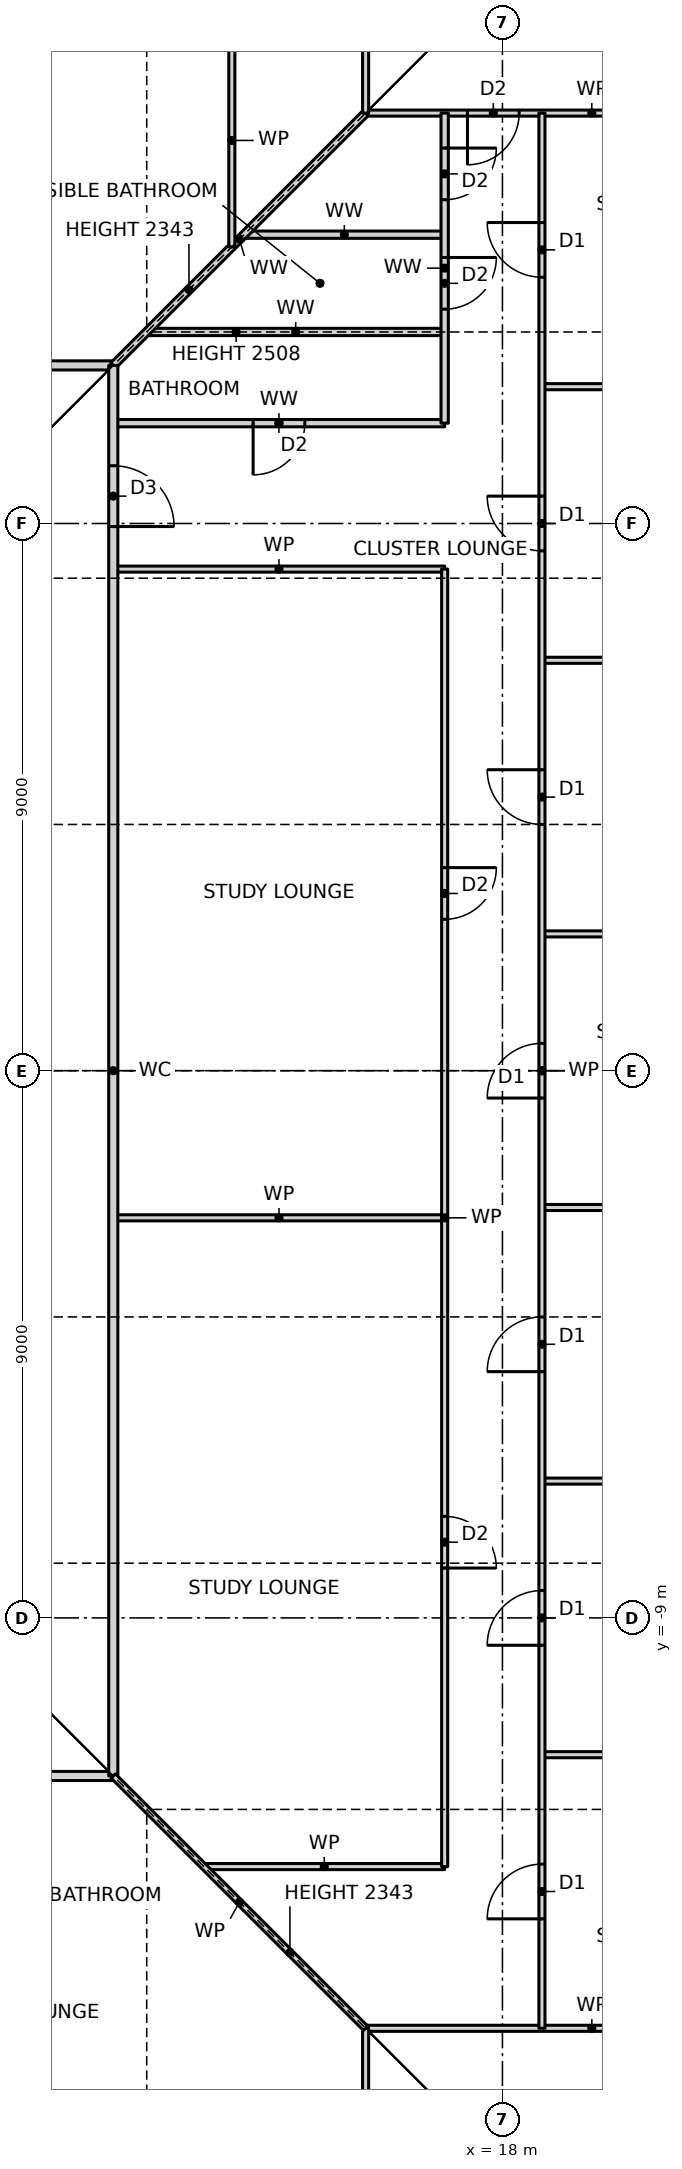
"""IFC4 building model, lengths in metres.
Left out: names, types, materials, properties, quantities, classifications, styles, units other than length and angle.
Written with IfcOpenShell. Run it as: python <this file> out.ifc"""

import sys

from ifc_helpers import new_model, si_unit, direction, frame, frame_2d, origin, place, context, subcontext, project, spatial, rectangle, extrude, element, fill, save


model = new_model("IFC4")
c1 = context("Model", 3, precision=1e-05, world=origin(), true_north=direction((0.0, 1.0)))
c2 = subcontext(c1, "Body", "Model", "MODEL_VIEW")
j1 = project(units=[si_unit("LENGTHUNIT", "METRE"), si_unit("PLANEANGLEUNIT", "RADIAN")], contexts=[c1])
p1 = place(None, origin())
s1 = spatial("IfcSite", under=j1, at=p1, CompositionType="ELEMENT")
p2 = place(p1, origin())
s2 = spatial("IfcBuilding", under=s1, at=p2, CompositionType="ELEMENT")
p3 = place(p2, frame((0.0, 0.0, 53.5)))
s3 = spatial("IfcBuildingStorey", under=s2, at=p3, CompositionType="ELEMENT", Elevation=53.5)
p4 = place(p3, frame((15.75, -15.75, 0.0), z_axis=(0.0, 0.0, 1.0), x_axis=(1.0, 0.0, 0.0)))
e1 = element("IfcWall", 1, at=p4, inside=s3, PredefinedType="PARTITIONING", context=c2, shape_type="SweptSolid", body=[
    extrude(rectangle(XDim=7.44, YDim=0.1, at=frame_2d((3.72, 0.0))), origin(), (0.0, 0.0, 1.0), 3.27),
])
p5 = place(p3, frame((13.09, -13.09, 0.0), z_axis=(0.0, 0.0, 1.0), x_axis=(1.0, 0.0, 0.0)))
e2 = element("IfcWall", 2, at=p5, inside=s3, PredefinedType="PARTITIONING", context=c2, shape_type="SweptSolid", body=[
    extrude(rectangle(XDim=3.96, YDim=0.1, at=frame_2d((1.98, 0.0))), origin(), (0.0, 0.0, 1.0), 3.27),
])
p6 = place(p3, frame((-12.6, -11.6, 0.0), z_axis=(0.0, 0.0, 1.0), x_axis=(1.0, 0.0, 0.0)))
e3 = element("IfcWall", 3, at=p6, inside=s3, PredefinedType="PARTITIONING", context=c2, shape_type="SweptSolid", body=[
    extrude(rectangle(XDim=24.2, YDim=0.15, at=frame_2d((12.1, 0.0))), origin(), (0.0, 0.0, 1.0), 3.27),
])
p7 = place(p6, frame((1.74, 0.0, 0.0)))
e4 = element("IfcOpeningElement", 4, at=p7, cuts=e3, PredefinedType="OPENING", context=c2, shape_type="SweptSolid", body=[
    extrude(rectangle(XDim=1.0, YDim=2.1, at=frame_2d((0.5, 1.05))), frame((0.0, 0.085, 0.0), z_axis=(0.0, -1.0, 0.0), x_axis=(1.0, 0.0, 0.0)), (0.0, 0.0, 1.0), 0.17),
])
p8 = place(p6, frame((22.025, 0.0, 0.0)))
e5 = element("IfcOpeningElement", 5, at=p8, cuts=e3, PredefinedType="OPENING", context=c2, shape_type="SweptSolid", body=[
    extrude(rectangle(XDim=1.0, YDim=2.1, at=frame_2d((0.5, 1.05))), frame((0.0, 0.085, 0.0), z_axis=(0.0, -1.0, 0.0), x_axis=(1.0, 0.0, 0.0)), (0.0, 0.0, 1.0), 0.17),
])
for number, where, z_axis, x_axis in (
    (6, (18.65, -11.25, 0.0), (0.0, 0.0, 1.0), (1.0, 0.0, 0.0)),
    (7, (18.65, -6.75, 0.0), (0.0, 0.0, 1.0), (1.0, 0.0, 0.0)),
):
    element("IfcWall", number, at=place(p3, frame(where, z_axis=z_axis, x_axis=x_axis)), inside=s3, PredefinedType="PARTITIONING", context=c2, shape_type="SweptSolid", body=[
        extrude(rectangle(XDim=4.54, YDim=0.1, at=frame_2d((2.27, 0.0))), origin(), (0.0, 0.0, 1.0), 3.27),
    ])
p9 = place(p3, frame((11.6, -2.42, 0.0), z_axis=(0.0, 0.0, 1.0), x_axis=(1.0, 0.0, 0.0)))
e8 = element("IfcWall", 8, at=p9, inside=s3, PredefinedType="PARTITIONING", context=c2, shape_type="SweptSolid", body=[
    extrude(rectangle(XDim=5.45, YDim=0.1, at=frame_2d((2.725, 0.0))), origin(), (0.0, 0.0, 1.0), 3.27),
])
for number, where, z_axis, x_axis in (
    (9, (18.65, -2.25, 0.0), (0.0, 0.0, 1.0), (1.0, 0.0, 0.0)),
    (10, (18.65, 2.25, 0.0), (0.0, 0.0, 1.0), (1.0, 0.0, 0.0)),
    (11, (18.65, 6.75, 0.0), (0.0, 0.0, 1.0), (1.0, 0.0, 0.0)),
):
    element("IfcWall", number, at=place(p3, frame(where, z_axis=z_axis, x_axis=x_axis)), inside=s3, PredefinedType="PARTITIONING", context=c2, shape_type="SweptSolid", body=[
        extrude(rectangle(XDim=4.54, YDim=0.1, at=frame_2d((2.27, 0.0))), origin(), (0.0, 0.0, 1.0), 3.27),
    ])
p10 = place(p3, frame((11.6, 8.25, 0.0), z_axis=(0.0, 0.0, 1.0), x_axis=(1.0, 0.0, 0.0)))
e12 = element("IfcWall", 12, at=p10, inside=s3, PredefinedType="PARTITIONING", context=c2, shape_type="SweptSolid", body=[
    extrude(rectangle(XDim=5.45, YDim=0.1, at=frame_2d((2.725, 0.0))), origin(), (0.0, 0.0, 1.0), 3.27),
])
p11 = place(p3, frame((11.6, 10.65, 0.0), z_axis=(0.0, 0.0, 1.0), x_axis=(1.0, 0.0, 0.0)))
e13 = element("IfcWall", 13, at=p11, inside=s3, PredefinedType="PARTITIONING", context=c2, shape_type="SweptSolid", body=[
    extrude(rectangle(XDim=5.45, YDim=0.12, at=frame_2d((2.725, 0.0))), origin(), (0.0, 0.0, 1.0), 3.27),
])
p12 = place(p11, frame((2.3, 0.0, 0.0)))
e14 = element("IfcOpeningElement", 14, at=p12, cuts=e13, PredefinedType="OPENING", context=c2, shape_type="SweptSolid", body=[
    extrude(rectangle(XDim=0.85, YDim=2.1, at=frame_2d((0.425, 1.05))), frame((0.0, 0.07, 0.0), z_axis=(0.0, -1.0, 0.0), x_axis=(1.0, 0.0, 0.0)), (0.0, 0.0, 1.0), 0.14),
])
p13 = place(p3, frame((18.65, 11.25, 0.0), z_axis=(0.0, 0.0, 1.0), x_axis=(1.0, 0.0, 0.0)))
e15 = element("IfcWall", 15, at=p13, inside=s3, PredefinedType="PARTITIONING", context=c2, shape_type="SweptSolid", body=[
    extrude(rectangle(XDim=4.54, YDim=0.1, at=frame_2d((2.27, 0.0))), origin(), (0.0, 0.0, 1.0), 3.27),
])
p14 = place(p3, frame((-12.6, 11.6, 0.0), z_axis=(0.0, 0.0, 1.0), x_axis=(1.0, 0.0, 0.0)))
e16 = element("IfcWall", 16, at=p14, inside=s3, PredefinedType="PARTITIONING", context=c2, shape_type="SweptSolid", body=[
    extrude(rectangle(XDim=24.2, YDim=0.15, at=frame_2d((12.1, 0.0))), origin(), (0.0, 0.0, 1.0), 3.27),
])
p15 = place(p14, frame((8.95, 0.0, 0.0)))
e17 = element("IfcOpeningElement", 17, at=p15, cuts=e16, PredefinedType="OPENING", context=c2, shape_type="SweptSolid", body=[
    extrude(rectangle(XDim=1.0, YDim=2.1, at=frame_2d((0.5, 1.05))), frame((0.0, 0.085, 0.0), z_axis=(0.0, -1.0, 0.0), x_axis=(1.0, 0.0, 0.0)), (0.0, 0.0, 1.0), 0.17),
])
p16 = place(p14, frame((6.9, 0.0, 0.0)))
e18 = element("IfcOpeningElement", 18, at=p16, cuts=e16, PredefinedType="OPENING", context=c2, shape_type="SweptSolid", body=[
    extrude(rectangle(XDim=0.9, YDim=2.1, at=frame_2d((0.45, 1.05))), frame((0.0, 0.085, 0.0), z_axis=(0.0, -1.0, 0.0), x_axis=(1.0, 0.0, 0.0)), (0.0, 0.0, 1.0), 0.17),
])
p17 = place(p3, frame((12.15, 12.15, 0.0), z_axis=(0.0, 0.0, 1.0), x_axis=(1.0, 0.0, 0.0)))
e19 = element("IfcWall", 19, at=p17, inside=s3, PredefinedType="PARTITIONING", context=c2, shape_type="SweptSolid", body=[
    extrude(rectangle(XDim=4.9, YDim=0.12, at=frame_2d((2.45, 0.0))), origin(), (0.0, 0.0, 1.0), 2.508),
])
p18 = place(p3, frame((13.75, 13.75, 0.0), z_axis=(0.0, 0.0, 1.0), x_axis=(1.0, 0.0, 0.0)))
e20 = element("IfcWall", 20, at=p18, inside=s3, PredefinedType="PARTITIONING", context=c2, shape_type="SweptSolid", body=[
    extrude(rectangle(XDim=3.3, YDim=0.12, at=frame_2d((1.65, 0.0))), origin(), (0.0, 0.0, 1.0), 3.27),
])
p19 = place(p3, frame((15.75, 15.75, 0.0), z_axis=(0.0, 0.0, 1.0), x_axis=(1.0, 0.0, 0.0)))
e21 = element("IfcWall", 21, at=p19, inside=s3, PredefinedType="PARTITIONING", context=c2, shape_type="SweptSolid", body=[
    extrude(rectangle(XDim=7.44, YDim=0.1, at=frame_2d((3.72, 0.0))), origin(), (0.0, 0.0, 1.0), 3.27),
])
p20 = place(p19, frame((1.675, 0.0, 0.0)))
e22 = element("IfcOpeningElement", 22, at=p20, cuts=e21, PredefinedType="OPENING", context=c2, shape_type="SweptSolid", body=[
    extrude(rectangle(XDim=0.85, YDim=2.1, at=frame_2d((0.425, 1.05))), frame((0.0, 0.06, 0.0), z_axis=(0.0, -1.0, 0.0), x_axis=(1.0, 0.0, 0.0)), (0.0, 0.0, 1.0), 0.12),
])
p21 = place(p3, frame((11.6, 11.6, 0.0), z_axis=(0.0, 0.0, 1.0), x_axis=(0.707106781187, 0.707106781187, 0.0)))
e23 = element("IfcWall", 23, at=p21, inside=s3, PredefinedType="PARTITIONING", context=c2, shape_type="SweptSolid", body=[
    extrude(rectangle(XDim=5.869, YDim=0.12, at=frame_2d((2.935, 0.0))), origin(), (0.0, 0.0, 1.0), 2.343),
])
p22 = place(p3, frame((18.65, -15.75, 0.0), z_axis=(0.0, 0.0, 1.0), x_axis=(0.0, 1.0, 0.0)))
e24 = element("IfcWall", 24, at=p22, inside=s3, PredefinedType="PARTITIONING", context=c2, shape_type="SweptSolid", body=[
    extrude(rectangle(XDim=31.5, YDim=0.1, at=frame_2d((15.75, 0.0))), origin(), (0.0, 0.0, 1.0), 3.27),
])
p23 = place(p22, frame((1.8, 0.0, 0.0)))
e25 = element("IfcOpeningElement", 25, at=p23, cuts=e24, PredefinedType="OPENING", context=c2, shape_type="SweptSolid", body=[
    extrude(rectangle(XDim=0.9, YDim=2.1, at=frame_2d((0.45, 1.05))), frame((0.0, 0.06, 0.0), z_axis=(0.0, -1.0, 0.0), x_axis=(1.0, 0.0, 0.0)), (0.0, 0.0, 1.0), 0.12),
])
p24 = place(p22, frame((6.3, 0.0, 0.0)))
e26 = element("IfcOpeningElement", 26, at=p24, cuts=e24, PredefinedType="OPENING", context=c2, shape_type="SweptSolid", body=[
    extrude(rectangle(XDim=0.9, YDim=2.1, at=frame_2d((0.45, 1.05))), frame((0.0, 0.06, 0.0), z_axis=(0.0, -1.0, 0.0), x_axis=(1.0, 0.0, 0.0)), (0.0, 0.0, 1.0), 0.12),
])
p25 = place(p22, frame((10.8, 0.0, 0.0)))
e27 = element("IfcOpeningElement", 27, at=p25, cuts=e24, PredefinedType="OPENING", context=c2, shape_type="SweptSolid", body=[
    extrude(rectangle(XDim=0.9, YDim=2.1, at=frame_2d((0.45, 1.05))), frame((0.0, 0.06, 0.0), z_axis=(0.0, -1.0, 0.0), x_axis=(1.0, 0.0, 0.0)), (0.0, 0.0, 1.0), 0.12),
])
p26 = place(p22, frame((15.3, 0.0, 0.0)))
e28 = element("IfcOpeningElement", 28, at=p26, cuts=e24, PredefinedType="OPENING", context=c2, shape_type="SweptSolid", body=[
    extrude(rectangle(XDim=0.9, YDim=2.1, at=frame_2d((0.45, 1.05))), frame((0.0, 0.06, 0.0), z_axis=(0.0, -1.0, 0.0), x_axis=(1.0, 0.0, 0.0)), (0.0, 0.0, 1.0), 0.12),
])
p27 = place(p22, frame((19.8, 0.0, 0.0)))
e29 = element("IfcOpeningElement", 29, at=p27, cuts=e24, PredefinedType="OPENING", context=c2, shape_type="SweptSolid", body=[
    extrude(rectangle(XDim=0.9, YDim=2.1, at=frame_2d((0.45, 1.05))), frame((0.0, 0.06, 0.0), z_axis=(0.0, -1.0, 0.0), x_axis=(1.0, 0.0, 0.0)), (0.0, 0.0, 1.0), 0.12),
])
p28 = place(p22, frame((24.3, 0.0, 0.0)))
e30 = element("IfcOpeningElement", 30, at=p28, cuts=e24, PredefinedType="OPENING", context=c2, shape_type="SweptSolid", body=[
    extrude(rectangle(XDim=0.9, YDim=2.1, at=frame_2d((0.45, 1.05))), frame((0.0, 0.06, 0.0), z_axis=(0.0, -1.0, 0.0), x_axis=(1.0, 0.0, 0.0)), (0.0, 0.0, 1.0), 0.12),
])
p29 = place(p22, frame((28.8, 0.0, 0.0)))
e31 = element("IfcOpeningElement", 31, at=p29, cuts=e24, PredefinedType="OPENING", context=c2, shape_type="SweptSolid", body=[
    extrude(rectangle(XDim=0.9, YDim=2.1, at=frame_2d((0.45, 1.05))), frame((0.0, 0.06, 0.0), z_axis=(0.0, -1.0, 0.0), x_axis=(1.0, 0.0, 0.0)), (0.0, 0.0, 1.0), 0.12),
])
p30 = place(p3, frame((17.05, -13.09, 0.0), z_axis=(0.0, 0.0, 1.0), x_axis=(0.0, 1.0, 0.0)))
e32 = element("IfcWall", 32, at=p30, inside=s3, PredefinedType="PARTITIONING", context=c2, shape_type="SweptSolid", body=[
    extrude(rectangle(XDim=21.34, YDim=0.1, at=frame_2d((10.67, 0.0))), origin(), (0.0, 0.0, 1.0), 3.27),
])
p31 = place(p30, frame((4.91, 0.0, 0.0)))
e33 = element("IfcOpeningElement", 33, at=p31, cuts=e32, PredefinedType="OPENING", context=c2, shape_type="SweptSolid", body=[
    extrude(rectangle(XDim=0.85, YDim=2.1, at=frame_2d((0.425, 1.05))), frame((0.0, 0.06, 0.0), z_axis=(0.0, -1.0, 0.0), x_axis=(1.0, 0.0, 0.0)), (0.0, 0.0, 1.0), 0.12),
])
p32 = place(p30, frame((15.58, 0.0, 0.0)))
e34 = element("IfcOpeningElement", 34, at=p32, cuts=e32, PredefinedType="OPENING", context=c2, shape_type="SweptSolid", body=[
    extrude(rectangle(XDim=0.85, YDim=2.1, at=frame_2d((0.425, 1.05))), frame((0.0, 0.06, 0.0), z_axis=(0.0, -1.0, 0.0), x_axis=(1.0, 0.0, 0.0)), (0.0, 0.0, 1.0), 0.12),
])
p33 = place(p3, frame((17.05, 10.65, 0.0), z_axis=(0.0, 0.0, 1.0), x_axis=(0.0, 1.0, 0.0)))
e35 = element("IfcWall", 35, at=p33, inside=s3, PredefinedType="PARTITIONING", context=c2, shape_type="SweptSolid", body=[
    extrude(rectangle(XDim=5.1, YDim=0.12, at=frame_2d((2.55, 0.0))), origin(), (0.0, 0.0, 1.0), 3.27),
])
p34 = place(p33, frame((1.875, 0.0, 0.0)))
e36 = element("IfcOpeningElement", 36, at=p34, cuts=e35, PredefinedType="OPENING", context=c2, shape_type="SweptSolid", body=[
    extrude(rectangle(XDim=0.85, YDim=2.1, at=frame_2d((0.425, 1.05))), frame((0.0, 0.07, 0.0), z_axis=(0.0, -1.0, 0.0), x_axis=(1.0, 0.0, 0.0)), (0.0, 0.0, 1.0), 0.14),
])
p35 = place(p33, frame((3.675, 0.0, 0.0)))
e37 = element("IfcOpeningElement", 37, at=p35, cuts=e35, PredefinedType="OPENING", context=c2, shape_type="SweptSolid", body=[
    extrude(rectangle(XDim=0.85, YDim=2.1, at=frame_2d((0.425, 1.05))), frame((0.0, 0.07, 0.0), z_axis=(0.0, -1.0, 0.0), x_axis=(1.0, 0.0, 0.0)), (0.0, 0.0, 1.0), 0.14),
])
p36 = place(p3, frame((15.75, -23.19, 0.0), z_axis=(0.0, 0.0, 1.0), x_axis=(0.0, 1.0, 0.0)))
e38 = element("IfcWall", 38, at=p36, inside=s3, PredefinedType="PARTITIONING", context=c2, shape_type="SweptSolid", body=[
    extrude(rectangle(XDim=7.44, YDim=0.1, at=frame_2d((3.72, 0.0))), origin(), (0.0, 0.0, 1.0), 3.27),
])
p37 = place(p36, frame((4.915, 0.0, 0.0)))
e39 = element("IfcOpeningElement", 39, at=p37, cuts=e38, PredefinedType="OPENING", context=c2, shape_type="SweptSolid", body=[
    extrude(rectangle(XDim=0.85, YDim=2.1, at=frame_2d((0.425, 1.05))), frame((0.0, 0.06, 0.0), z_axis=(0.0, -1.0, 0.0), x_axis=(1.0, 0.0, 0.0)), (0.0, 0.0, 1.0), 0.12),
])
p38 = place(p3, frame((15.75, 15.75, 0.0), z_axis=(0.0, 0.0, 1.0), x_axis=(0.0, 1.0, 0.0)))
e40 = element("IfcWall", 40, at=p38, inside=s3, PredefinedType="PARTITIONING", context=c2, shape_type="SweptSolid", body=[
    extrude(rectangle(XDim=7.44, YDim=0.1, at=frame_2d((3.72, 0.0))), origin(), (0.0, 0.0, 1.0), 3.27),
])
p39 = place(p3, frame((13.55, 13.55, 0.0), z_axis=(0.0, 0.0, 1.0), x_axis=(0.0, 1.0, 0.0)))
e41 = element("IfcWall", 41, at=p39, inside=s3, PredefinedType="PARTITIONING", context=c2, shape_type="SweptSolid", body=[
    extrude(rectangle(XDim=3.5, YDim=0.1, at=frame_2d((1.75, 0.0))), origin(), (0.0, 0.0, 1.0), 3.27),
])
p40 = place(p3, frame((11.6, -11.6, 0.0), z_axis=(0.0, 0.0, 1.0), x_axis=(0.0, 1.0, 0.0)))
e42 = element("IfcWall", 42, at=p40, inside=s3, PredefinedType="PARTITIONING", context=c2, shape_type="SweptSolid", body=[
    extrude(rectangle(XDim=23.2, YDim=0.15, at=frame_2d((11.6, 0.0))), origin(), (0.0, 0.0, 1.0), 3.27),
])
p41 = place(p40, frame((20.55, 0.0, 0.0)))
e43 = element("IfcOpeningElement", 43, at=p41, cuts=e42, PredefinedType="OPENING", context=c2, shape_type="SweptSolid", body=[
    extrude(rectangle(XDim=1.0, YDim=2.1, at=frame_2d((0.5, 1.05))), frame((0.0, 0.085, 0.0), z_axis=(0.0, -1.0, 0.0), x_axis=(1.0, 0.0, 0.0)), (0.0, 0.0, 1.0), 0.17),
])
p42 = place(p3, frame((15.75, -15.75, 0.0), z_axis=(0.0, 0.0, 1.0), x_axis=(-0.707106781187, 0.707106781187, 0.0)))
e44 = element("IfcWall", 44, at=p42, inside=s3, PredefinedType="PARTITIONING", context=c2, shape_type="SweptSolid", body=[
    extrude(rectangle(XDim=5.869, YDim=0.1, at=frame_2d((2.935, 0.0))), origin(), (0.0, 0.0, 1.0), 2.343),
])
p43 = place(p23, origin())
e45 = element("IfcDoor", 45, at=p43, inside=s3, OperationType="SINGLE_SWING_LEFT", PredefinedType="DOOR", context=c2, shape_type="SweptSolid", body=[
    extrude(rectangle(XDim=0.9, YDim=2.1, at=frame_2d((0.45, 1.05))), frame((0.0, 0.025, 0.0), z_axis=(0.0, -1.0, 0.0), x_axis=(1.0, 0.0, 0.0)), (0.0, 0.0, 1.0), 0.05),
])
fill(e25, e45)
p44 = place(p24, origin())
e46 = element("IfcDoor", 46, at=p44, inside=s3, OperationType="SINGLE_SWING_LEFT", PredefinedType="DOOR", context=c2, shape_type="SweptSolid", body=[
    extrude(rectangle(XDim=0.9, YDim=2.1, at=frame_2d((0.45, 1.05))), frame((0.0, 0.025, 0.0), z_axis=(0.0, -1.0, 0.0), x_axis=(1.0, 0.0, 0.0)), (0.0, 0.0, 1.0), 0.05),
])
fill(e26, e46)
p45 = place(p25, origin())
e47 = element("IfcDoor", 47, at=p45, inside=s3, OperationType="SINGLE_SWING_LEFT", PredefinedType="DOOR", context=c2, shape_type="SweptSolid", body=[
    extrude(rectangle(XDim=0.9, YDim=2.1, at=frame_2d((0.45, 1.05))), frame((0.0, 0.025, 0.0), z_axis=(0.0, -1.0, 0.0), x_axis=(1.0, 0.0, 0.0)), (0.0, 0.0, 1.0), 0.05),
])
fill(e27, e47)
p46 = place(p26, origin())
e48 = element("IfcDoor", 48, at=p46, inside=s3, OperationType="SINGLE_SWING_LEFT", PredefinedType="DOOR", context=c2, shape_type="SweptSolid", body=[
    extrude(rectangle(XDim=0.9, YDim=2.1, at=frame_2d((0.45, 1.05))), frame((0.0, 0.025, 0.0), z_axis=(0.0, -1.0, 0.0), x_axis=(1.0, 0.0, 0.0)), (0.0, 0.0, 1.0), 0.05),
])
fill(e28, e48)
p47 = place(p27, origin())
e49 = element("IfcDoor", 49, at=p47, inside=s3, OperationType="SINGLE_SWING_RIGHT", PredefinedType="DOOR", context=c2, shape_type="SweptSolid", body=[
    extrude(rectangle(XDim=0.9, YDim=2.1, at=frame_2d((0.45, 1.05))), frame((0.0, 0.025, 0.0), z_axis=(0.0, -1.0, 0.0), x_axis=(1.0, 0.0, 0.0)), (0.0, 0.0, 1.0), 0.05),
])
fill(e29, e49)
p48 = place(p28, origin())
e50 = element("IfcDoor", 50, at=p48, inside=s3, OperationType="SINGLE_SWING_RIGHT", PredefinedType="DOOR", context=c2, shape_type="SweptSolid", body=[
    extrude(rectangle(XDim=0.9, YDim=2.1, at=frame_2d((0.45, 1.05))), frame((0.0, 0.025, 0.0), z_axis=(0.0, -1.0, 0.0), x_axis=(1.0, 0.0, 0.0)), (0.0, 0.0, 1.0), 0.05),
])
fill(e30, e50)
p49 = place(p29, origin())
e51 = element("IfcDoor", 51, at=p49, inside=s3, OperationType="SINGLE_SWING_RIGHT", PredefinedType="DOOR", context=c2, shape_type="SweptSolid", body=[
    extrude(rectangle(XDim=0.9, YDim=2.1, at=frame_2d((0.45, 1.05))), frame((0.0, 0.025, 0.0), z_axis=(0.0, -1.0, 0.0), x_axis=(1.0, 0.0, 0.0)), (0.0, 0.0, 1.0), 0.05),
])
fill(e31, e51)
p50 = place(p41, frame((1.0, 0.0, 0.0), z_axis=(0.0, 0.0, 1.0), x_axis=(-1.0, 0.0, 0.0)))
e52 = element("IfcDoor", 52, at=p50, inside=s3, OperationType="SINGLE_SWING_RIGHT", PredefinedType="DOOR", context=c2, shape_type="SweptSolid", body=[
    extrude(rectangle(XDim=1.0, YDim=2.1, at=frame_2d((0.5, 1.05))), frame((0.0, 0.025, 0.0), z_axis=(0.0, -1.0, 0.0), x_axis=(1.0, 0.0, 0.0)), (0.0, 0.0, 1.0), 0.05),
])
fill(e43, e52)
p51 = place(p31, frame((0.85, 0.0, 0.0), z_axis=(0.0, 0.0, 1.0), x_axis=(-1.0, 0.0, 0.0)))
e53 = element("IfcDoor", 53, at=p51, inside=s3, OperationType="SINGLE_SWING_RIGHT", PredefinedType="DOOR", context=c2, shape_type="SweptSolid", body=[
    extrude(rectangle(XDim=0.85, YDim=2.1, at=frame_2d((0.425, 1.05))), frame((0.0, 0.025, 0.0), z_axis=(0.0, -1.0, 0.0), x_axis=(1.0, 0.0, 0.0)), (0.0, 0.0, 1.0), 0.05),
])
fill(e33, e53)
p52 = place(p32, frame((0.85, 0.0, 0.0), z_axis=(0.0, 0.0, 1.0), x_axis=(-1.0, 0.0, 0.0)))
e54 = element("IfcDoor", 54, at=p52, inside=s3, OperationType="SINGLE_SWING_LEFT", PredefinedType="DOOR", context=c2, shape_type="SweptSolid", body=[
    extrude(rectangle(XDim=0.85, YDim=2.1, at=frame_2d((0.425, 1.05))), frame((0.0, 0.025, 0.0), z_axis=(0.0, -1.0, 0.0), x_axis=(1.0, 0.0, 0.0)), (0.0, 0.0, 1.0), 0.05),
])
fill(e34, e54)
p53 = place(p12, frame((0.85, 0.0, 0.0), z_axis=(0.0, 0.0, 1.0), x_axis=(-1.0, 0.0, 0.0)))
e55 = element("IfcDoor", 55, at=p53, inside=s3, OperationType="SINGLE_SWING_RIGHT", PredefinedType="DOOR", context=c2, shape_type="SweptSolid", body=[
    extrude(rectangle(XDim=0.85, YDim=2.1, at=frame_2d((0.425, 1.05))), frame((0.0, 0.025, 0.0), z_axis=(0.0, -1.0, 0.0), x_axis=(1.0, 0.0, 0.0)), (0.0, 0.0, 1.0), 0.05),
])
fill(e14, e55)
p54 = place(p34, frame((0.85, 0.0, 0.0), z_axis=(0.0, 0.0, 1.0), x_axis=(-1.0, 0.0, 0.0)))
e56 = element("IfcDoor", 56, at=p54, inside=s3, OperationType="SINGLE_SWING_LEFT", PredefinedType="DOOR", context=c2, shape_type="SweptSolid", body=[
    extrude(rectangle(XDim=0.85, YDim=2.1, at=frame_2d((0.425, 1.05))), frame((0.0, 0.025, 0.0), z_axis=(0.0, -1.0, 0.0), x_axis=(1.0, 0.0, 0.0)), (0.0, 0.0, 1.0), 0.05),
])
fill(e36, e56)
p55 = place(p35, frame((0.85, 0.0, 0.0), z_axis=(0.0, 0.0, 1.0), x_axis=(-1.0, 0.0, 0.0)))
e57 = element("IfcDoor", 57, at=p55, inside=s3, OperationType="SINGLE_SWING_LEFT", PredefinedType="DOOR", context=c2, shape_type="SweptSolid", body=[
    extrude(rectangle(XDim=0.85, YDim=2.1, at=frame_2d((0.425, 1.05))), frame((0.0, 0.025, 0.0), z_axis=(0.0, -1.0, 0.0), x_axis=(1.0, 0.0, 0.0)), (0.0, 0.0, 1.0), 0.05),
])
fill(e37, e57)
p56 = place(p20, frame((0.85, 0.0, 0.0), z_axis=(0.0, 0.0, 1.0), x_axis=(-1.0, 0.0, 0.0)))
e58 = element("IfcDoor", 58, at=p56, inside=s3, OperationType="SINGLE_SWING_RIGHT", PredefinedType="DOOR", context=c2, shape_type="SweptSolid", body=[
    extrude(rectangle(XDim=0.85, YDim=2.1, at=frame_2d((0.425, 1.05))), frame((0.0, 0.025, 0.0), z_axis=(0.0, -1.0, 0.0), x_axis=(1.0, 0.0, 0.0)), (0.0, 0.0, 1.0), 0.05),
])
fill(e22, e58)
save(model, sys.argv[1])
